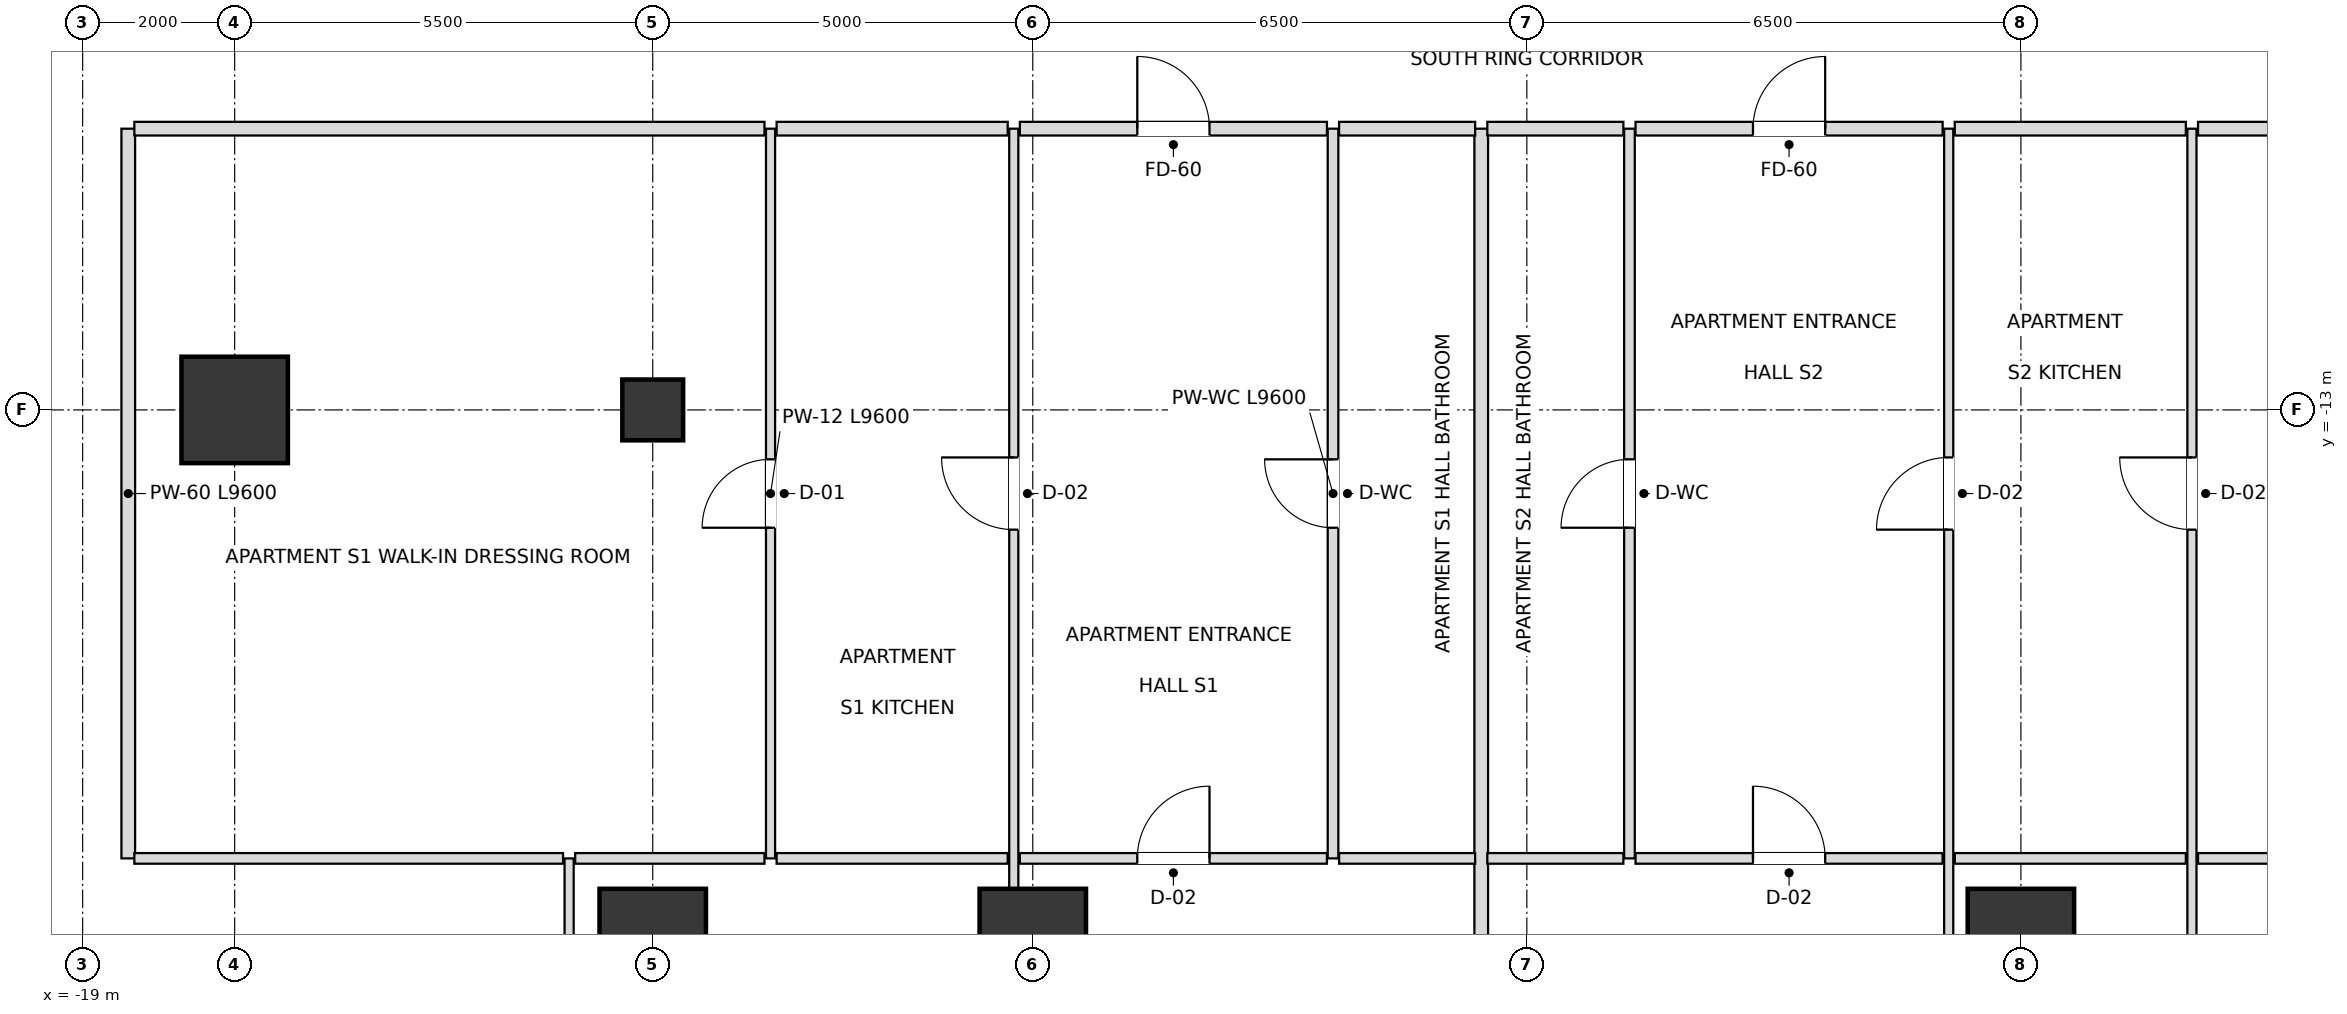
"""IFC4 building model, lengths in metres.
Left out: names, types, materials, properties, quantities, classifications, styles, units other than length and angle.
Written with IfcOpenShell. Run it as: python <this file> out.ifc"""

import sys

from ifc_helpers import new_model, si_unit, direction, frame, frame_2d, origin, origin_2d, place, context, subcontext, project, spatial, rectangle, extrude, element, fill, save


model = new_model("IFC4")
c1 = context("Model", 3, precision=1e-05, world=origin(), true_north=direction((0.0, 1.0)))
c2 = subcontext(c1, "Body", "Model", "MODEL_VIEW")
j1 = project(units=[si_unit("LENGTHUNIT", "METRE"), si_unit("PLANEANGLEUNIT", "RADIAN")], contexts=[c1])
p1 = place(None, origin())
s1 = spatial("IfcSite", under=j1, at=p1, CompositionType="ELEMENT")
p2 = place(p1, origin())
s2 = spatial("IfcBuilding", under=s1, at=p2, CompositionType="ELEMENT")
p3 = place(p2, frame((0.0, 0.0, 72.0)))
s3 = spatial("IfcBuildingStorey", under=s2, at=p3, CompositionType="ELEMENT", Elevation=72.0)
for number, where, z_axis, x_axis in (
    (1, (-11.5, -20.0, 0.0), (0.0, 0.0, 1.0), (1.0, 0.0, 0.0)),
    (2, (-6.5, -20.0, 0.0), (0.0, 0.0, 1.0), (1.0, 0.0, 0.0)),
    (3, (6.5, -20.0, 0.0), (0.0, 0.0, 1.0), (1.0, 0.0, 0.0)),
    (4, (-17.0, -13.0, 0.0), (0.0, 0.0, 1.0), (1.0, 0.0, 0.0)),
):
    element("IfcColumn", number, at=place(p3, frame(where, z_axis=z_axis, x_axis=x_axis)), inside=s3, PredefinedType="USERDEFINED", context=c2, shape_type="SweptSolid", body=[
        extrude(rectangle(XDim=1.4, YDim=1.4, at=origin_2d()), origin(), (0.0, 0.0, 1.0), 3.6),
    ])
p4 = place(p3, frame((-11.5, -13.0, 0.0), z_axis=(0.0, 0.0, 1.0), x_axis=(1.0, 0.0, 0.0)))
e5 = element("IfcColumn", 5, at=p4, inside=s3, PredefinedType="COLUMN", context=c2, shape_type="SweptSolid", body=[
    extrude(rectangle(XDim=0.8, YDim=0.8, at=origin_2d()), origin(), (0.0, 0.0, 1.0), 3.6),
])
p5 = place(p3, frame((-18.4, -18.9, 0.0), z_axis=(0.0, 0.0, 1.0), x_axis=(0.0, 1.0, 0.0)))
e6 = element("IfcWall", 6, at=p5, inside=s3, PredefinedType="PARTITIONING", context=c2, shape_type="SweptSolid", body=[
    extrude(rectangle(XDim=9.6, YDim=0.18, at=frame_2d((4.8, 0.0))), origin(), (0.0, 0.0, 1.0), 2.736),
])
p6 = place(p3, frame((-12.6, -24.9, 0.0), z_axis=(0.0, 0.0, 1.0), x_axis=(0.0, 1.0, 0.0)))
e7 = element("IfcWall", 7, at=p6, inside=s3, PredefinedType="PARTITIONING", context=c2, shape_type="SweptSolid", body=[
    extrude(rectangle(XDim=6.0, YDim=0.12, at=frame_2d((3.0, 0.0))), origin(), (0.0, 0.0, 1.0), 2.736),
])
p7 = place(p6, frame((2.55, 0.0, 0.0)))
e8 = element("IfcOpeningElement", 8, at=p7, cuts=e7, PredefinedType="OPENING", context=c2, shape_type="SweptSolid", body=[
    extrude(rectangle(XDim=0.9, YDim=2.1, at=frame_2d((0.45, 1.05))), frame((0.0, 0.07, 0.0), z_axis=(0.0, -1.0, 0.0), x_axis=(1.0, 0.0, 0.0)), (0.0, 0.0, 1.0), 0.14),
])
p8 = place(p3, frame((-9.95, -18.9, 0.0), z_axis=(0.0, 0.0, 1.0), x_axis=(0.0, 1.0, 0.0)))
e9 = element("IfcWall", 9, at=p8, inside=s3, PredefinedType="PARTITIONING", context=c2, shape_type="SweptSolid", body=[
    extrude(rectangle(XDim=9.6, YDim=0.12, at=frame_2d((4.8, 0.0))), origin(), (0.0, 0.0, 1.0), 2.816),
])
p9 = place(p8, frame((4.35, 0.0, 0.0)))
e10 = element("IfcOpeningElement", 10, at=p9, cuts=e9, PredefinedType="OPENING", context=c2, shape_type="SweptSolid", body=[
    extrude(rectangle(XDim=0.9, YDim=2.1, at=frame_2d((0.45, 1.05))), frame((0.0, 0.07, 0.0), z_axis=(0.0, -1.0, 0.0), x_axis=(1.0, 0.0, 0.0)), (0.0, 0.0, 1.0), 0.14),
])
p10 = place(p3, frame((-6.75, -24.9, 0.0), z_axis=(0.0, 0.0, 1.0), x_axis=(0.0, 1.0, 0.0)))
e11 = element("IfcWall", 11, at=p10, inside=s3, PredefinedType="PARTITIONING", context=c2, shape_type="SweptSolid", body=[
    extrude(rectangle(XDim=15.6, YDim=0.12, at=frame_2d((7.8, 0.0))), origin(), (0.0, 0.0, 1.0), 2.816),
])
p11 = place(p10, frame((10.325, 0.0, 0.0)))
e12 = element("IfcOpeningElement", 12, at=p11, cuts=e11, PredefinedType="OPENING", context=c2, shape_type="SweptSolid", body=[
    extrude(rectangle(XDim=0.95, YDim=2.1, at=frame_2d((0.475, 1.05))), frame((0.0, 0.07, 0.0), z_axis=(0.0, -1.0, 0.0), x_axis=(1.0, 0.0, 0.0)), (0.0, 0.0, 1.0), 0.14),
])
p12 = place(p10, frame((2.55, 0.0, 0.0)))
e13 = element("IfcOpeningElement", 13, at=p12, cuts=e11, PredefinedType="OPENING", context=c2, shape_type="SweptSolid", body=[
    extrude(rectangle(XDim=0.9, YDim=2.1, at=frame_2d((0.45, 1.05))), frame((0.0, 0.07, 0.0), z_axis=(0.0, -1.0, 0.0), x_axis=(1.0, 0.0, 0.0)), (0.0, 0.0, 1.0), 0.14),
])
p13 = place(p3, frame((-2.55, -18.9, 0.0), z_axis=(0.0, 0.0, 1.0), x_axis=(0.0, 1.0, 0.0)))
e14 = element("IfcWall", 14, at=p13, inside=s3, PredefinedType="PARTITIONING", context=c2, shape_type="SweptSolid", body=[
    extrude(rectangle(XDim=9.6, YDim=0.14, at=frame_2d((4.8, 0.0))), origin(), (0.0, 0.0, 1.0), 2.948),
])
p14 = place(p13, frame((4.35, 0.0, 0.0)))
e15 = element("IfcOpeningElement", 15, at=p14, cuts=e14, PredefinedType="OPENING", context=c2, shape_type="SweptSolid", body=[
    extrude(rectangle(XDim=0.9, YDim=2.1, at=frame_2d((0.45, 1.05))), frame((0.0, 0.08, 0.0), z_axis=(0.0, -1.0, 0.0), x_axis=(1.0, 0.0, 0.0)), (0.0, 0.0, 1.0), 0.16),
])
p15 = place(p3, frame((-0.6, -24.9, 0.0), z_axis=(0.0, 0.0, 1.0), x_axis=(0.0, 1.0, 0.0)))
e16 = element("IfcWall", 16, at=p15, inside=s3, PredefinedType="PARTITIONING", context=c2, shape_type="SweptSolid", body=[
    extrude(rectangle(XDim=15.6, YDim=0.18, at=frame_2d((7.8, 0.0))), origin(), (0.0, 0.0, 1.0), 2.816),
])
p16 = place(p3, frame((1.35, -18.9, 0.0), z_axis=(0.0, 0.0, 1.0), x_axis=(0.0, 1.0, 0.0)))
e17 = element("IfcWall", 17, at=p16, inside=s3, PredefinedType="PARTITIONING", context=c2, shape_type="SweptSolid", body=[
    extrude(rectangle(XDim=9.6, YDim=0.14, at=frame_2d((4.8, 0.0))), origin(), (0.0, 0.0, 1.0), 2.948),
])
p17 = place(p16, frame((4.35, 0.0, 0.0)))
e18 = element("IfcOpeningElement", 18, at=p17, cuts=e17, PredefinedType="OPENING", context=c2, shape_type="SweptSolid", body=[
    extrude(rectangle(XDim=0.9, YDim=2.1, at=frame_2d((0.45, 1.05))), frame((0.0, 0.08, 0.0), z_axis=(0.0, -1.0, 0.0), x_axis=(1.0, 0.0, 0.0)), (0.0, 0.0, 1.0), 0.16),
])
p18 = place(p3, frame((5.55, -24.9, 0.0), z_axis=(0.0, 0.0, 1.0), x_axis=(0.0, 1.0, 0.0)))
e19 = element("IfcWall", 19, at=p18, inside=s3, PredefinedType="PARTITIONING", context=c2, shape_type="SweptSolid", body=[
    extrude(rectangle(XDim=15.6, YDim=0.12, at=frame_2d((7.8, 0.0))), origin(), (0.0, 0.0, 1.0), 2.816),
])
p19 = place(p18, frame((10.325, 0.0, 0.0)))
e20 = element("IfcOpeningElement", 20, at=p19, cuts=e19, PredefinedType="OPENING", context=c2, shape_type="SweptSolid", body=[
    extrude(rectangle(XDim=0.95, YDim=2.1, at=frame_2d((0.475, 1.05))), frame((0.0, 0.07, 0.0), z_axis=(0.0, -1.0, 0.0), x_axis=(1.0, 0.0, 0.0)), (0.0, 0.0, 1.0), 0.14),
])
p20 = place(p18, frame((2.55, 0.0, 0.0)))
e21 = element("IfcOpeningElement", 21, at=p20, cuts=e19, PredefinedType="OPENING", context=c2, shape_type="SweptSolid", body=[
    extrude(rectangle(XDim=0.9, YDim=2.1, at=frame_2d((0.45, 1.05))), frame((0.0, 0.07, 0.0), z_axis=(0.0, -1.0, 0.0), x_axis=(1.0, 0.0, 0.0)), (0.0, 0.0, 1.0), 0.14),
])
p21 = place(p3, frame((8.75, -24.9, 0.0), z_axis=(0.0, 0.0, 1.0), x_axis=(0.0, 1.0, 0.0)))
e22 = element("IfcWall", 22, at=p21, inside=s3, PredefinedType="PARTITIONING", context=c2, shape_type="SweptSolid", body=[
    extrude(rectangle(XDim=15.6, YDim=0.12, at=frame_2d((7.8, 0.0))), origin(), (0.0, 0.0, 1.0), 2.816),
])
p22 = place(p21, frame((10.325, 0.0, 0.0)))
e23 = element("IfcOpeningElement", 23, at=p22, cuts=e22, PredefinedType="OPENING", context=c2, shape_type="SweptSolid", body=[
    extrude(rectangle(XDim=0.95, YDim=2.1, at=frame_2d((0.475, 1.05))), frame((0.0, 0.07, 0.0), z_axis=(0.0, -1.0, 0.0), x_axis=(1.0, 0.0, 0.0)), (0.0, 0.0, 1.0), 0.14),
])
p23 = place(p21, frame((2.55, 0.0, 0.0)))
e24 = element("IfcOpeningElement", 24, at=p23, cuts=e22, PredefinedType="OPENING", context=c2, shape_type="SweptSolid", body=[
    extrude(rectangle(XDim=0.9, YDim=2.1, at=frame_2d((0.45, 1.05))), frame((0.0, 0.07, 0.0), z_axis=(0.0, -1.0, 0.0), x_axis=(1.0, 0.0, 0.0)), (0.0, 0.0, 1.0), 0.14),
])
p24 = place(p3, frame((-18.32, -18.9, 0.0), z_axis=(0.0, 0.0, 1.0), x_axis=(1.0, 0.0, 0.0)))
e25 = element("IfcWall", 25, at=p24, inside=s3, PredefinedType="PARTITIONING", context=c2, shape_type="SweptSolid", body=[
    extrude(rectangle(XDim=5.64, YDim=0.14, at=frame_2d((2.82, 0.0))), origin(), (0.0, 0.0, 1.0), 2.736),
])
p25 = place(p3, frame((-12.52, -18.9, 0.0), z_axis=(0.0, 0.0, 1.0), x_axis=(1.0, 0.0, 0.0)))
e26 = element("IfcWall", 26, at=p25, inside=s3, PredefinedType="PARTITIONING", context=c2, shape_type="SweptSolid", body=[
    extrude(rectangle(XDim=2.49, YDim=0.14, at=frame_2d((1.245, 0.0))), origin(), (0.0, 0.0, 1.0), 2.736),
])
p26 = place(p3, frame((-9.87, -18.9, 0.0), z_axis=(0.0, 0.0, 1.0), x_axis=(1.0, 0.0, 0.0)))
e27 = element("IfcWall", 27, at=p26, inside=s3, PredefinedType="PARTITIONING", context=c2, shape_type="SweptSolid", body=[
    extrude(rectangle(XDim=3.04, YDim=0.14, at=frame_2d((1.52, 0.0))), origin(), (0.0, 0.0, 1.0), 3.38),
])
p27 = place(p3, frame((-6.67, -18.9, 0.0), z_axis=(0.0, 0.0, 1.0), x_axis=(1.0, 0.0, 0.0)))
e28 = element("IfcWall", 28, at=p27, inside=s3, PredefinedType="PARTITIONING", context=c2, shape_type="SweptSolid", body=[
    extrude(rectangle(XDim=4.04, YDim=0.14, at=frame_2d((2.02, 0.0))), origin(), (0.0, 0.0, 1.0), 2.816),
])
p28 = place(p27, frame((1.545, 0.0, 0.0)))
e29 = element("IfcOpeningElement", 29, at=p28, cuts=e28, PredefinedType="OPENING", context=c2, shape_type="SweptSolid", body=[
    extrude(rectangle(XDim=0.95, YDim=2.1, at=frame_2d((0.475, 1.05))), frame((0.0, 0.08, 0.0), z_axis=(0.0, -1.0, 0.0), x_axis=(1.0, 0.0, 0.0)), (0.0, 0.0, 1.0), 0.16),
])
for number, where, z_axis, x_axis in (
    (30, (-2.47, -18.9, 0.0), (0.0, 0.0, 1.0), (1.0, 0.0, 0.0)),
    (31, (-0.52, -18.9, 0.0), (0.0, 0.0, 1.0), (1.0, 0.0, 0.0)),
):
    element("IfcWall", number, at=place(p3, frame(where, z_axis=z_axis, x_axis=x_axis)), inside=s3, PredefinedType="PARTITIONING", context=c2, shape_type="SweptSolid", body=[
        extrude(rectangle(XDim=1.79, YDim=0.14, at=frame_2d((0.895, 0.0))), origin(), (0.0, 0.0, 1.0), 3.38),
    ])
p29 = place(p3, frame((1.43, -18.9, 0.0), z_axis=(0.0, 0.0, 1.0), x_axis=(1.0, 0.0, 0.0)))
e32 = element("IfcWall", 32, at=p29, inside=s3, PredefinedType="PARTITIONING", context=c2, shape_type="SweptSolid", body=[
    extrude(rectangle(XDim=4.04, YDim=0.14, at=frame_2d((2.02, 0.0))), origin(), (0.0, 0.0, 1.0), 3.38),
])
p30 = place(p29, frame((1.545, 0.0, 0.0)))
e33 = element("IfcOpeningElement", 33, at=p30, cuts=e32, PredefinedType="OPENING", context=c2, shape_type="SweptSolid", body=[
    extrude(rectangle(XDim=0.95, YDim=2.1, at=frame_2d((0.475, 1.05))), frame((0.0, 0.08, 0.0), z_axis=(0.0, -1.0, 0.0), x_axis=(1.0, 0.0, 0.0)), (0.0, 0.0, 1.0), 0.16),
])
p31 = place(p3, frame((5.63, -18.9, 0.0), z_axis=(0.0, 0.0, 1.0), x_axis=(1.0, 0.0, 0.0)))
e34 = element("IfcWall", 34, at=p31, inside=s3, PredefinedType="PARTITIONING", context=c2, shape_type="SweptSolid", body=[
    extrude(rectangle(XDim=3.04, YDim=0.14, at=frame_2d((1.52, 0.0))), origin(), (0.0, 0.0, 1.0), 2.816),
])
p32 = place(p3, frame((8.83, -18.9, 0.0), z_axis=(0.0, 0.0, 1.0), x_axis=(1.0, 0.0, 0.0)))
e35 = element("IfcWall", 35, at=p32, inside=s3, PredefinedType="PARTITIONING", context=c2, shape_type="SweptSolid", body=[
    extrude(rectangle(XDim=4.14, YDim=0.14, at=frame_2d((2.07, 0.0))), origin(), (0.0, 0.0, 1.0), 2.736),
])
p33 = place(p3, frame((-18.32, -9.3, 0.0), z_axis=(0.0, 0.0, 1.0), x_axis=(1.0, 0.0, 0.0)))
e36 = element("IfcWall", 36, at=p33, inside=s3, PredefinedType="PARTITIONING", context=c2, shape_type="SweptSolid", body=[
    extrude(rectangle(XDim=8.29, YDim=0.18, at=frame_2d((4.145, 0.0))), origin(), (0.0, 0.0, 1.0), 2.816),
])
p34 = place(p3, frame((-9.87, -9.3, 0.0), z_axis=(0.0, 0.0, 1.0), x_axis=(1.0, 0.0, 0.0)))
e37 = element("IfcWall", 37, at=p34, inside=s3, PredefinedType="PARTITIONING", context=c2, shape_type="SweptSolid", body=[
    extrude(rectangle(XDim=3.04, YDim=0.18, at=frame_2d((1.52, 0.0))), origin(), (0.0, 0.0, 1.0), 3.38),
])
p35 = place(p3, frame((-6.67, -9.3, 0.0), z_axis=(0.0, 0.0, 1.0), x_axis=(1.0, 0.0, 0.0)))
e38 = element("IfcWall", 38, at=p35, inside=s3, PredefinedType="PARTITIONING", context=c2, shape_type="SweptSolid", body=[
    extrude(rectangle(XDim=4.04, YDim=0.18, at=frame_2d((2.02, 0.0))), origin(), (0.0, 0.0, 1.0), 2.816),
])
p36 = place(p35, frame((1.545, 0.0, 0.0)))
e39 = element("IfcOpeningElement", 39, at=p36, cuts=e38, PredefinedType="OPENING", context=c2, shape_type="SweptSolid", body=[
    extrude(rectangle(XDim=0.95, YDim=2.15, at=frame_2d((0.475, 1.075))), frame((0.0, 0.1, 0.0), z_axis=(0.0, -1.0, 0.0), x_axis=(1.0, 0.0, 0.0)), (0.0, 0.0, 1.0), 0.2),
])
for number, where, z_axis, x_axis in (
    (40, (-2.47, -9.3, 0.0), (0.0, 0.0, 1.0), (1.0, 0.0, 0.0)),
    (41, (-0.52, -9.3, 0.0), (0.0, 0.0, 1.0), (1.0, 0.0, 0.0)),
):
    element("IfcWall", number, at=place(p3, frame(where, z_axis=z_axis, x_axis=x_axis)), inside=s3, PredefinedType="PARTITIONING", context=c2, shape_type="SweptSolid", body=[
        extrude(rectangle(XDim=1.79, YDim=0.18, at=frame_2d((0.895, 0.0))), origin(), (0.0, 0.0, 1.0), 3.38),
    ])
p37 = place(p3, frame((1.43, -9.3, 0.0), z_axis=(0.0, 0.0, 1.0), x_axis=(1.0, 0.0, 0.0)))
e42 = element("IfcWall", 42, at=p37, inside=s3, PredefinedType="PARTITIONING", context=c2, shape_type="SweptSolid", body=[
    extrude(rectangle(XDim=4.04, YDim=0.18, at=frame_2d((2.02, 0.0))), origin(), (0.0, 0.0, 1.0), 3.38),
])
p38 = place(p37, frame((1.545, 0.0, 0.0)))
e43 = element("IfcOpeningElement", 43, at=p38, cuts=e42, PredefinedType="OPENING", context=c2, shape_type="SweptSolid", body=[
    extrude(rectangle(XDim=0.95, YDim=2.15, at=frame_2d((0.475, 1.075))), frame((0.0, 0.1, 0.0), z_axis=(0.0, -1.0, 0.0), x_axis=(1.0, 0.0, 0.0)), (0.0, 0.0, 1.0), 0.2),
])
p39 = place(p3, frame((5.63, -9.3, 0.0), z_axis=(0.0, 0.0, 1.0), x_axis=(1.0, 0.0, 0.0)))
e44 = element("IfcWall", 44, at=p39, inside=s3, PredefinedType="PARTITIONING", context=c2, shape_type="SweptSolid", body=[
    extrude(rectangle(XDim=3.04, YDim=0.18, at=frame_2d((1.52, 0.0))), origin(), (0.0, 0.0, 1.0), 2.816),
])
p40 = place(p3, frame((8.83, -9.3, 0.0), z_axis=(0.0, 0.0, 1.0), x_axis=(1.0, 0.0, 0.0)))
e45 = element("IfcWall", 45, at=p40, inside=s3, PredefinedType="PARTITIONING", context=c2, shape_type="SweptSolid", body=[
    extrude(rectangle(XDim=9.49, YDim=0.18, at=frame_2d((4.745, 0.0))), origin(), (0.0, 0.0, 1.0), 2.816),
])
p41 = place(p14, origin())
e46 = element("IfcDoor", 46, at=p41, inside=s3, OperationType="SINGLE_SWING_RIGHT", PredefinedType="DOOR", context=c2, shape_type="SweptSolid", body=[
    extrude(rectangle(XDim=0.9, YDim=2.1, at=frame_2d((0.45, 1.05))), frame((0.0, 0.025, 0.0), z_axis=(0.0, -1.0, 0.0), x_axis=(1.0, 0.0, 0.0)), (0.0, 0.0, 1.0), 0.05),
])
fill(e15, e46)
p42 = place(p36, origin())
e47 = element("IfcDoor", 47, at=p42, inside=s3, OperationType="SINGLE_SWING_LEFT", PredefinedType="DOOR", context=c2, shape_type="SweptSolid", body=[
    extrude(rectangle(XDim=0.95, YDim=2.15, at=frame_2d((0.475, 1.075))), frame((0.0, 0.025, 0.0), z_axis=(0.0, -1.0, 0.0), x_axis=(1.0, 0.0, 0.0)), (0.0, 0.0, 1.0), 0.05),
])
fill(e39, e47)
p43 = place(p11, origin())
e48 = element("IfcDoor", 48, at=p43, inside=s3, OperationType="SINGLE_SWING_RIGHT", PredefinedType="DOOR", context=c2, shape_type="SweptSolid", body=[
    extrude(rectangle(XDim=0.95, YDim=2.1, at=frame_2d((0.475, 1.05))), frame((0.0, 0.025, 0.0), z_axis=(0.0, -1.0, 0.0), x_axis=(1.0, 0.0, 0.0)), (0.0, 0.0, 1.0), 0.05),
])
fill(e12, e48)
p44 = place(p9, origin())
e49 = element("IfcDoor", 49, at=p44, inside=s3, OperationType="SINGLE_SWING_LEFT", PredefinedType="DOOR", context=c2, shape_type="SweptSolid", body=[
    extrude(rectangle(XDim=0.9, YDim=2.1, at=frame_2d((0.45, 1.05))), frame((0.0, 0.025, 0.0), z_axis=(0.0, -1.0, 0.0), x_axis=(1.0, 0.0, 0.0)), (0.0, 0.0, 1.0), 0.05),
])
fill(e10, e49)
p45 = place(p28, origin())
e50 = element("IfcDoor", 50, at=p45, inside=s3, OperationType="SINGLE_SWING_RIGHT", PredefinedType="DOOR", context=c2, shape_type="SweptSolid", body=[
    extrude(rectangle(XDim=0.95, YDim=2.1, at=frame_2d((0.475, 1.05))), frame((0.0, 0.025, 0.0), z_axis=(0.0, -1.0, 0.0), x_axis=(1.0, 0.0, 0.0)), (0.0, 0.0, 1.0), 0.05),
])
fill(e29, e50)
p46 = place(p17, origin())
e51 = element("IfcDoor", 51, at=p46, inside=s3, OperationType="SINGLE_SWING_LEFT", PredefinedType="DOOR", context=c2, shape_type="SweptSolid", body=[
    extrude(rectangle(XDim=0.9, YDim=2.1, at=frame_2d((0.45, 1.05))), frame((0.0, 0.025, 0.0), z_axis=(0.0, -1.0, 0.0), x_axis=(1.0, 0.0, 0.0)), (0.0, 0.0, 1.0), 0.05),
])
fill(e18, e51)
p47 = place(p38, origin())
e52 = element("IfcDoor", 52, at=p47, inside=s3, OperationType="SINGLE_SWING_RIGHT", PredefinedType="DOOR", context=c2, shape_type="SweptSolid", body=[
    extrude(rectangle(XDim=0.95, YDim=2.15, at=frame_2d((0.475, 1.075))), frame((0.0, 0.025, 0.0), z_axis=(0.0, -1.0, 0.0), x_axis=(1.0, 0.0, 0.0)), (0.0, 0.0, 1.0), 0.05),
])
fill(e43, e52)
p48 = place(p19, origin())
e53 = element("IfcDoor", 53, at=p48, inside=s3, OperationType="SINGLE_SWING_LEFT", PredefinedType="DOOR", context=c2, shape_type="SweptSolid", body=[
    extrude(rectangle(XDim=0.95, YDim=2.1, at=frame_2d((0.475, 1.05))), frame((0.0, 0.025, 0.0), z_axis=(0.0, -1.0, 0.0), x_axis=(1.0, 0.0, 0.0)), (0.0, 0.0, 1.0), 0.05),
])
fill(e20, e53)
p49 = place(p22, origin())
e54 = element("IfcDoor", 54, at=p49, inside=s3, OperationType="SINGLE_SWING_RIGHT", PredefinedType="DOOR", context=c2, shape_type="SweptSolid", body=[
    extrude(rectangle(XDim=0.95, YDim=2.1, at=frame_2d((0.475, 1.05))), frame((0.0, 0.025, 0.0), z_axis=(0.0, -1.0, 0.0), x_axis=(1.0, 0.0, 0.0)), (0.0, 0.0, 1.0), 0.05),
])
fill(e23, e54)
p50 = place(p30, origin())
e55 = element("IfcDoor", 55, at=p50, inside=s3, OperationType="SINGLE_SWING_LEFT", PredefinedType="DOOR", context=c2, shape_type="SweptSolid", body=[
    extrude(rectangle(XDim=0.95, YDim=2.1, at=frame_2d((0.475, 1.05))), frame((0.0, 0.025, 0.0), z_axis=(0.0, -1.0, 0.0), x_axis=(1.0, 0.0, 0.0)), (0.0, 0.0, 1.0), 0.05),
])
fill(e33, e55)
save(model, sys.argv[1])
